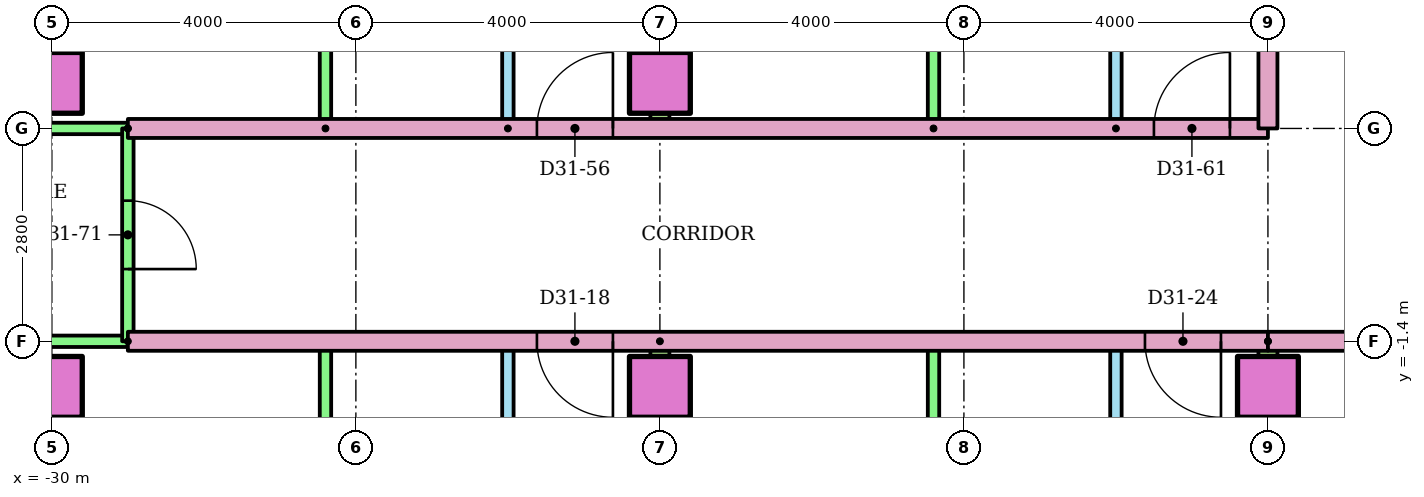
"""IFC4 building model, lengths in metres.
Left out: names, types, materials, properties, quantities, classifications, styles, units other than length and angle.
Written with IfcOpenShell. Run it as: python <this file> out.ifc"""

import sys

from ifc_helpers import new_model, si_unit, direction, frame, frame_2d, origin, origin_2d, place, context, subcontext, project, spatial, rectangle, extrude, element, fill, save


model = new_model("IFC4")
c1 = context("Model", 3, precision=1e-05, world=origin(), true_north=direction((0.0, 1.0)))
c2 = subcontext(c1, "Body", "Model", "MODEL_VIEW")
j1 = project(units=[si_unit("LENGTHUNIT", "METRE"), si_unit("PLANEANGLEUNIT", "RADIAN")], contexts=[c1])
p1 = place(None, origin())
s1 = spatial("IfcSite", under=j1, at=p1, CompositionType="ELEMENT")
p2 = place(p1, origin())
s2 = spatial("IfcBuilding", under=s1, at=p2, CompositionType="ELEMENT")
p3 = place(p2, frame((0.0, 0.0, 123.0)))
s3 = spatial("IfcBuildingStorey", under=s2, at=p3, CompositionType="ELEMENT", Elevation=123.0)
for number, where in (
    (1, (-30.0, -2.0, 0.0)),
    (2, (-22.0, -2.0, 0.0)),
    (3, (-14.0, -2.0, 0.0)),
    (4, (-30.0, 2.0, 0.0)),
    (5, (-22.0, 2.0, 0.0)),
):
    element("IfcColumn", number, at=place(p3, frame(where)), inside=s3, PredefinedType="COLUMN", context=c2, shape_type="SweptSolid", body=[
        extrude(rectangle(XDim=0.8, YDim=0.8, at=origin_2d()), origin(), (0.0, 0.0, 1.0), 3.2),
    ])
p4 = place(p3, frame((-24.0, -8.0, 0.0), z_axis=(0.0, 0.0, 1.0), x_axis=(0.0, 1.0, 0.0)))
e6 = element("IfcWall", 6, at=p4, inside=s3, PredefinedType="PARTITIONING", context=c2, shape_type="SweptSolid", body=[
    extrude(rectangle(XDim=6.6, YDim=0.15, at=frame_2d((3.3, 0.0))), origin(), (0.0, 0.0, 1.0), 2.4),
])
p5 = place(p4, frame((4.275, 0.0, 0.0)))
e7 = element("IfcOpeningElement", 7, at=p5, cuts=e6, PredefinedType="OPENING", context=c2, shape_type="SweptSolid", body=[
    extrude(rectangle(XDim=0.9, YDim=2.1, at=frame_2d((0.45, 1.05))), frame((0.0, 0.085, 0.0), z_axis=(0.0, -1.0, 0.0), x_axis=(1.0, 0.0, 0.0)), (0.0, 0.0, 1.0), 0.17),
])
p6 = place(p4, frame((1.025, 0.0, 0.0)))
e8 = element("IfcOpeningElement", 8, at=p6, cuts=e6, PredefinedType="OPENING", context=c2, shape_type="SweptSolid", body=[
    extrude(rectangle(XDim=0.8, YDim=2.1, at=frame_2d((0.4, 1.05))), frame((0.0, 0.085, 0.0), z_axis=(0.0, -1.0, 0.0), x_axis=(1.0, 0.0, 0.0)), (0.0, 0.0, 1.0), 0.17),
])
p7 = place(p3, frame((-26.4, -8.0, 0.0), z_axis=(0.0, 0.0, 1.0), x_axis=(0.0, 1.0, 0.0)))
e9 = element("IfcWall", 9, at=p7, inside=s3, PredefinedType="PARTITIONING", context=c2, shape_type="SweptSolid", body=[
    extrude(rectangle(XDim=6.6, YDim=0.15, at=frame_2d((3.3, 0.0))), origin(), (0.0, 0.0, 1.0), 2.4),
])
p8 = place(p3, frame((-16.0, -8.0, 0.0), z_axis=(0.0, 0.0, 1.0), x_axis=(0.0, 1.0, 0.0)))
e10 = element("IfcWall", 10, at=p8, inside=s3, PredefinedType="PARTITIONING", context=c2, shape_type="SweptSolid", body=[
    extrude(rectangle(XDim=6.6, YDim=0.15, at=frame_2d((3.3, 0.0))), origin(), (0.0, 0.0, 1.0), 2.4),
])
p9 = place(p8, frame((4.275, 0.0, 0.0)))
e11 = element("IfcOpeningElement", 11, at=p9, cuts=e10, PredefinedType="OPENING", context=c2, shape_type="SweptSolid", body=[
    extrude(rectangle(XDim=0.9, YDim=2.1, at=frame_2d((0.45, 1.05))), frame((0.0, 0.085, 0.0), z_axis=(0.0, -1.0, 0.0), x_axis=(1.0, 0.0, 0.0)), (0.0, 0.0, 1.0), 0.17),
])
p10 = place(p8, frame((1.025, 0.0, 0.0)))
e12 = element("IfcOpeningElement", 12, at=p10, cuts=e10, PredefinedType="OPENING", context=c2, shape_type="SweptSolid", body=[
    extrude(rectangle(XDim=0.8, YDim=2.1, at=frame_2d((0.4, 1.05))), frame((0.0, 0.085, 0.0), z_axis=(0.0, -1.0, 0.0), x_axis=(1.0, 0.0, 0.0)), (0.0, 0.0, 1.0), 0.17),
])
p11 = place(p3, frame((-18.4, -8.0, 0.0), z_axis=(0.0, 0.0, 1.0), x_axis=(0.0, 1.0, 0.0)))
e13 = element("IfcWall", 13, at=p11, inside=s3, PredefinedType="PARTITIONING", context=c2, shape_type="SweptSolid", body=[
    extrude(rectangle(XDim=6.6, YDim=0.15, at=frame_2d((3.3, 0.0))), origin(), (0.0, 0.0, 1.0), 2.4),
])
for number, where, z_axis, x_axis in (
    (14, (-22.0, -1.4, 0.0), (0.0, 0.0, 1.0), (0.0, -1.0, 0.0)),
    (15, (-14.0, -1.4, 0.0), (0.0, 0.0, 1.0), (0.0, -1.0, 0.0)),
):
    element("IfcWall", number, at=place(p3, frame(where, z_axis=z_axis, x_axis=x_axis)), inside=s3, PredefinedType="PARTITIONING", context=c2, shape_type="SweptSolid", body=[
        extrude(rectangle(XDim=14.91, YDim=0.25, at=frame_2d((7.455, 0.0))), origin(), (0.0, 0.0, 1.0), 2.4),
    ])
p12 = place(p3, frame((-14.0, -1.4, 0.0), z_axis=(0.0, 0.0, 1.0), x_axis=(-1.0, 0.0, 0.0)))
e16 = element("IfcWall", 16, at=p12, inside=s3, PredefinedType="PARTITIONING", context=c2, shape_type="SweptSolid", body=[
    extrude(rectangle(XDim=15.0, YDim=0.25, at=frame_2d((7.5, 0.0))), origin(), (0.0, 0.0, 1.0), 2.4),
])
p13 = place(p12, frame((8.618, 0.0, 0.0)))
e17 = element("IfcOpeningElement", 17, at=p13, cuts=e16, PredefinedType="OPENING", context=c2, shape_type="SweptSolid", body=[
    extrude(rectangle(XDim=1.0, YDim=2.1, at=frame_2d((0.5, 1.05))), frame((0.0, 0.135, 0.0), z_axis=(0.0, -1.0, 0.0), x_axis=(1.0, 0.0, 0.0)), (0.0, 0.0, 1.0), 0.27),
])
p14 = place(p12, frame((0.618, 0.0, 0.0)))
e18 = element("IfcOpeningElement", 18, at=p14, cuts=e16, PredefinedType="OPENING", context=c2, shape_type="SweptSolid", body=[
    extrude(rectangle(XDim=1.0, YDim=2.1, at=frame_2d((0.5, 1.05))), frame((0.0, 0.135, 0.0), z_axis=(0.0, -1.0, 0.0), x_axis=(1.0, 0.0, 0.0)), (0.0, 0.0, 1.0), 0.27),
])
p15 = place(p3, frame((-29.0, -1.4, 0.0), z_axis=(0.0, 0.0, 1.0), x_axis=(-1.0, 0.0, 0.0)))
e19 = element("IfcWall", 19, at=p15, inside=s3, PredefinedType="PARTITIONING", context=c2, shape_type="SweptSolid", body=[
    extrude(rectangle(XDim=3.72, YDim=0.15, at=frame_2d((1.86, 0.0))), origin(), (0.0, 0.0, 1.0), 2.4),
])
p16 = place(p3, frame((-24.0, 1.4, 0.0), z_axis=(0.0, 0.0, 1.0), x_axis=(0.0, 1.0, 0.0)))
e20 = element("IfcWall", 20, at=p16, inside=s3, PredefinedType="PARTITIONING", context=c2, shape_type="SweptSolid", body=[
    extrude(rectangle(XDim=9.0, YDim=0.15, at=frame_2d((4.5, 0.0))), origin(), (0.0, 0.0, 1.0), 2.4),
])
p17 = place(p16, frame((2.05, 0.0, 0.0)))
e21 = element("IfcOpeningElement", 21, at=p17, cuts=e20, PredefinedType="OPENING", context=c2, shape_type="SweptSolid", body=[
    extrude(rectangle(XDim=0.9, YDim=2.1, at=frame_2d((0.45, 1.05))), frame((0.0, 0.085, 0.0), z_axis=(0.0, -1.0, 0.0), x_axis=(1.0, 0.0, 0.0)), (0.0, 0.0, 1.0), 0.17),
])
p18 = place(p16, frame((6.6, 0.0, 0.0)))
e22 = element("IfcOpeningElement", 22, at=p18, cuts=e20, PredefinedType="OPENING", context=c2, shape_type="SweptSolid", body=[
    extrude(rectangle(XDim=0.8, YDim=2.1, at=frame_2d((0.4, 1.05))), frame((0.0, 0.085, 0.0), z_axis=(0.0, -1.0, 0.0), x_axis=(1.0, 0.0, 0.0)), (0.0, 0.0, 1.0), 0.17),
])
p19 = place(p3, frame((-26.4, 1.4, 0.0), z_axis=(0.0, 0.0, 1.0), x_axis=(0.0, 1.0, 0.0)))
e23 = element("IfcWall", 23, at=p19, inside=s3, PredefinedType="PARTITIONING", context=c2, shape_type="SweptSolid", body=[
    extrude(rectangle(XDim=9.0, YDim=0.15, at=frame_2d((4.5, 0.0))), origin(), (0.0, 0.0, 1.0), 2.4),
])
p20 = place(p3, frame((-16.0, 1.4, 0.0), z_axis=(0.0, 0.0, 1.0), x_axis=(0.0, 1.0, 0.0)))
e24 = element("IfcWall", 24, at=p20, inside=s3, PredefinedType="PARTITIONING", context=c2, shape_type="SweptSolid", body=[
    extrude(rectangle(XDim=9.0, YDim=0.15, at=frame_2d((4.5, 0.0))), origin(), (0.0, 0.0, 1.0), 2.4),
])
p21 = place(p20, frame((2.05, 0.0, 0.0)))
e25 = element("IfcOpeningElement", 25, at=p21, cuts=e24, PredefinedType="OPENING", context=c2, shape_type="SweptSolid", body=[
    extrude(rectangle(XDim=0.9, YDim=2.1, at=frame_2d((0.45, 1.05))), frame((0.0, 0.085, 0.0), z_axis=(0.0, -1.0, 0.0), x_axis=(1.0, 0.0, 0.0)), (0.0, 0.0, 1.0), 0.17),
])
p22 = place(p20, frame((6.6, 0.0, 0.0)))
e26 = element("IfcOpeningElement", 26, at=p22, cuts=e24, PredefinedType="OPENING", context=c2, shape_type="SweptSolid", body=[
    extrude(rectangle(XDim=0.8, YDim=2.1, at=frame_2d((0.4, 1.05))), frame((0.0, 0.085, 0.0), z_axis=(0.0, -1.0, 0.0), x_axis=(1.0, 0.0, 0.0)), (0.0, 0.0, 1.0), 0.17),
])
p23 = place(p3, frame((-18.4, 1.4, 0.0), z_axis=(0.0, 0.0, 1.0), x_axis=(0.0, 1.0, 0.0)))
e27 = element("IfcWall", 27, at=p23, inside=s3, PredefinedType="PARTITIONING", context=c2, shape_type="SweptSolid", body=[
    extrude(rectangle(XDim=9.0, YDim=0.15, at=frame_2d((4.5, 0.0))), origin(), (0.0, 0.0, 1.0), 2.4),
])
p24 = place(p3, frame((-22.0, 18.721, 0.0), z_axis=(0.0, 0.0, 1.0), x_axis=(0.0, -1.0, 0.0)))
e28 = element("IfcWall", 28, at=p24, inside=s3, PredefinedType="PARTITIONING", context=c2, shape_type="SweptSolid", body=[
    extrude(rectangle(XDim=17.321, YDim=0.25, at=frame_2d((8.661, 0.0))), origin(), (0.0, 0.0, 1.0), 2.4),
])
p25 = place(p3, frame((-29.0, 1.4, 0.0)))
e29 = element("IfcWall", 29, at=p25, inside=s3, PredefinedType="PARTITIONING", context=c2, shape_type="SweptSolid", body=[
    extrude(rectangle(XDim=15.0, YDim=0.25, at=frame_2d((7.5, 0.0))), origin(), (0.0, 0.0, 1.0), 2.4),
])
p26 = place(p25, frame((5.382, 0.0, 0.0)))
e30 = element("IfcOpeningElement", 30, at=p26, cuts=e29, PredefinedType="OPENING", context=c2, shape_type="SweptSolid", body=[
    extrude(rectangle(XDim=1.0, YDim=2.1, at=frame_2d((0.5, 1.05))), frame((0.0, 0.135, 0.0), z_axis=(0.0, -1.0, 0.0), x_axis=(1.0, 0.0, 0.0)), (0.0, 0.0, 1.0), 0.27),
])
p27 = place(p25, frame((13.5, 0.0, 0.0)))
e31 = element("IfcOpeningElement", 31, at=p27, cuts=e29, PredefinedType="OPENING", context=c2, shape_type="SweptSolid", body=[
    extrude(rectangle(XDim=1.0, YDim=2.1, at=frame_2d((0.5, 1.05))), frame((0.0, 0.135, 0.0), z_axis=(0.0, -1.0, 0.0), x_axis=(1.0, 0.0, 0.0)), (0.0, 0.0, 1.0), 0.27),
])
p28 = place(p3, frame((-32.72, 1.4, 0.0)))
e32 = element("IfcWall", 32, at=p28, inside=s3, PredefinedType="PARTITIONING", context=c2, shape_type="SweptSolid", body=[
    extrude(rectangle(XDim=3.72, YDim=0.15, at=frame_2d((1.86, 0.0))), origin(), (0.0, 0.0, 1.0), 2.4),
])
p29 = place(p3, frame((-29.0, 1.4, 0.0), z_axis=(0.0, 0.0, 1.0), x_axis=(0.0, -1.0, 0.0)))
e33 = element("IfcWall", 33, at=p29, inside=s3, PredefinedType="PARTITIONING", context=c2, shape_type="SweptSolid", body=[
    extrude(rectangle(XDim=2.8, YDim=0.15, at=frame_2d((1.4, 0.0))), origin(), (0.0, 0.0, 1.0), 2.4),
])
p30 = place(p29, frame((0.95, 0.0, 0.0)))
e34 = element("IfcOpeningElement", 34, at=p30, cuts=e33, PredefinedType="OPENING", context=c2, shape_type="SweptSolid", body=[
    extrude(rectangle(XDim=0.9, YDim=2.1, at=frame_2d((0.45, 1.05))), frame((0.0, 0.085, 0.0), z_axis=(0.0, -1.0, 0.0), x_axis=(1.0, 0.0, 0.0)), (0.0, 0.0, 1.0), 0.17),
])
p31 = place(p3, frame((14.0, -1.4, 0.0), z_axis=(0.0, 0.0, 1.0), x_axis=(-1.0, 0.0, 0.0)))
e35 = element("IfcWall", 35, at=p31, inside=s3, PredefinedType="PARTITIONING", context=c2, shape_type="SweptSolid", body=[
    extrude(rectangle(XDim=28.0, YDim=0.25, at=frame_2d((14.0, 0.0))), origin(), (0.0, 0.0, 1.0), 2.4),
])
p32 = place(p31, frame((12.618, 0.0, 0.0)))
e36 = element("IfcOpeningElement", 36, at=p32, cuts=e35, PredefinedType="OPENING", context=c2, shape_type="SweptSolid", body=[
    extrude(rectangle(XDim=1.0, YDim=2.1, at=frame_2d((0.5, 1.05))), frame((0.0, 0.135, 0.0), z_axis=(0.0, -1.0, 0.0), x_axis=(1.0, 0.0, 0.0)), (0.0, 0.0, 1.0), 0.27),
])
p33 = place(p31, frame((10.382, 0.0, 0.0)))
e37 = element("IfcOpeningElement", 37, at=p33, cuts=e35, PredefinedType="OPENING", context=c2, shape_type="SweptSolid", body=[
    extrude(rectangle(XDim=1.0, YDim=2.1, at=frame_2d((0.5, 1.05))), frame((0.0, 0.135, 0.0), z_axis=(0.0, -1.0, 0.0), x_axis=(1.0, 0.0, 0.0)), (0.0, 0.0, 1.0), 0.27),
])
p34 = place(p3, frame((-14.0, 3.0, 0.0), z_axis=(0.0, 0.0, 1.0), x_axis=(0.0, -1.0, 0.0)))
e38 = element("IfcWall", 38, at=p34, inside=s3, PredefinedType="PARTITIONING", context=c2, shape_type="SweptSolid", body=[
    extrude(rectangle(XDim=1.6, YDim=0.25, at=frame_2d((0.8, 0.0))), origin(), (0.0, 0.0, 1.0), 2.4),
])
p35 = place(p13, origin())
e39 = element("IfcDoor", 39, at=p35, inside=s3, OperationType="SINGLE_SWING_LEFT", PredefinedType="DOOR", context=c2, shape_type="SweptSolid", body=[
    extrude(rectangle(XDim=1.0, YDim=2.1, at=frame_2d((0.5, 1.05))), frame((0.0, 0.025, 0.0), z_axis=(0.0, -1.0, 0.0), x_axis=(1.0, 0.0, 0.0)), (0.0, 0.0, 1.0), 0.05),
])
fill(e17, e39)
p36 = place(p14, origin())
e40 = element("IfcDoor", 40, at=p36, inside=s3, OperationType="SINGLE_SWING_LEFT", PredefinedType="DOOR", context=c2, shape_type="SweptSolid", body=[
    extrude(rectangle(XDim=1.0, YDim=2.1, at=frame_2d((0.5, 1.05))), frame((0.0, 0.025, 0.0), z_axis=(0.0, -1.0, 0.0), x_axis=(1.0, 0.0, 0.0)), (0.0, 0.0, 1.0), 0.05),
])
fill(e18, e40)
p37 = place(p26, origin())
e41 = element("IfcDoor", 41, at=p37, inside=s3, OperationType="SINGLE_SWING_RIGHT", PredefinedType="DOOR", context=c2, shape_type="SweptSolid", body=[
    extrude(rectangle(XDim=1.0, YDim=2.1, at=frame_2d((0.5, 1.05))), frame((0.0, 0.025, 0.0), z_axis=(0.0, -1.0, 0.0), x_axis=(1.0, 0.0, 0.0)), (0.0, 0.0, 1.0), 0.05),
])
fill(e30, e41)
p38 = place(p27, origin())
e42 = element("IfcDoor", 42, at=p38, inside=s3, OperationType="SINGLE_SWING_RIGHT", PredefinedType="DOOR", context=c2, shape_type="SweptSolid", body=[
    extrude(rectangle(XDim=1.0, YDim=2.1, at=frame_2d((0.5, 1.05))), frame((0.0, 0.025, 0.0), z_axis=(0.0, -1.0, 0.0), x_axis=(1.0, 0.0, 0.0)), (0.0, 0.0, 1.0), 0.05),
])
fill(e31, e42)
p39 = place(p30, origin())
e43 = element("IfcDoor", 43, at=p39, inside=s3, OperationType="SINGLE_SWING_RIGHT", PredefinedType="DOOR", context=c2, shape_type="SweptSolid", body=[
    extrude(rectangle(XDim=0.9, YDim=2.1, at=frame_2d((0.45, 1.05))), frame((0.0, 0.025, 0.0), z_axis=(0.0, -1.0, 0.0), x_axis=(1.0, 0.0, 0.0)), (0.0, 0.0, 1.0), 0.05),
])
fill(e34, e43)
save(model, sys.argv[1])
